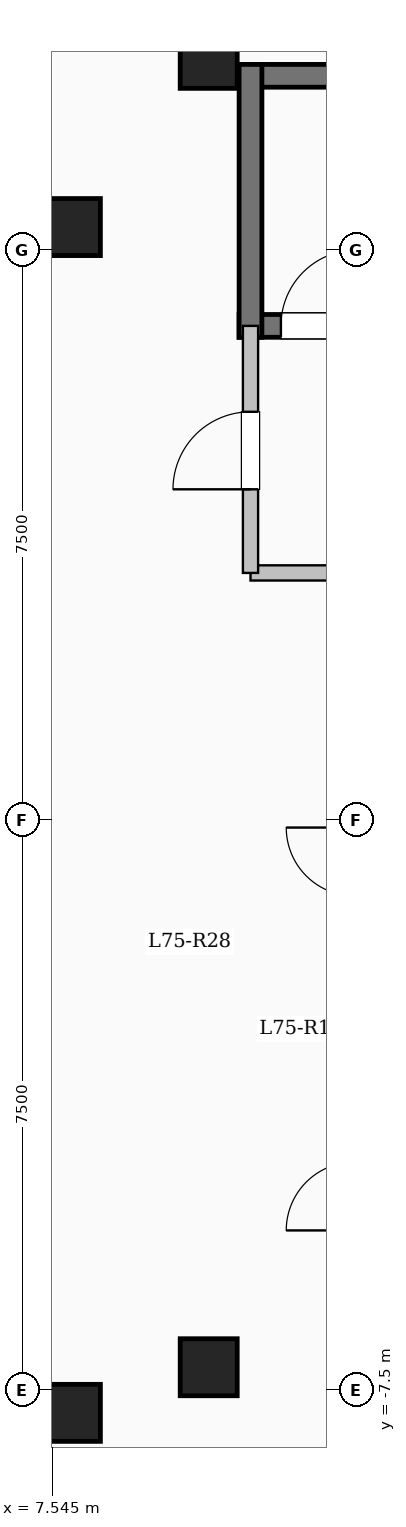
"""IFC4 building model, lengths in metres.
Left out: names, types, materials, properties, quantities, classifications, styles, units other than length and angle.
Written with IfcOpenShell. Run it as: python <this file> out.ifc"""

import sys

from ifc_helpers import new_model, si_unit, direction, frame, frame_2d, origin, origin_2d, place, context, subcontext, project, spatial, rectangle, extrude, element, fill, save


model = new_model("IFC4")
c1 = context("Model", 3, precision=1e-05, world=origin(), true_north=direction((0.0, 1.0)))
c2 = subcontext(c1, "Body", "Model", "MODEL_VIEW")
j1 = project(units=[si_unit("LENGTHUNIT", "METRE"), si_unit("PLANEANGLEUNIT", "RADIAN")], contexts=[c1])
p1 = place(None, origin())
s1 = spatial("IfcSite", under=j1, at=p1, CompositionType="ELEMENT")
p2 = place(p1, origin())
s2 = spatial("IfcBuilding", under=s1, at=p2, CompositionType="ELEMENT")
p3 = place(p2, frame((0.0, 0.0, 276.3)))
s3 = spatial("IfcBuildingStorey", under=s2, at=p3, CompositionType="ELEMENT", Elevation=276.3)
for number, where, z_axis, x_axis in (
    (1, (7.8, -7.8, 0.0), (0.0, 0.0, 1.0), (1.0, 0.0, 0.0)),
    (2, (7.8, 7.8, 0.0), (0.0, 0.0, 1.0), (1.0, 0.0, 0.0)),
    (3, (9.6, -7.2, 0.0), (0.0, 0.0, 1.0), (1.0, 0.0, 0.0)),
    (4, (9.6, 10.0, 0.0), (0.0, 0.0, 1.0), (1.0, 0.0, 0.0)),
):
    element("IfcColumn", number, at=place(p3, frame(where, z_axis=z_axis, x_axis=x_axis)), inside=s3, PredefinedType="COLUMN", context=c2, shape_type="SweptSolid", body=[
        extrude(rectangle(XDim=0.75, YDim=0.75, at=origin_2d()), origin(), (0.0, 0.0, 1.0), 5.25),
    ])
p4 = place(p3, frame((10.0, 9.79, 0.0), z_axis=(0.0, 0.0, 1.0), x_axis=(1.0, 0.0, 0.0)))
e5 = element("IfcWall", 5, at=p4, inside=s3, PredefinedType="SHEAR", context=c2, shape_type="SweptSolid", body=[
    extrude(rectangle(XDim=8.0, YDim=0.3, at=frame_2d((4.0, 0.0))), origin(), (0.0, 0.0, 1.0), 5.25),
])
p5 = place(p3, frame((10.0, 6.5, 0.0), z_axis=(0.0, 0.0, 1.0), x_axis=(1.0, 0.0, 0.0)))
e6 = element("IfcWall", 6, at=p5, inside=s3, PredefinedType="SHEAR", context=c2, shape_type="SweptSolid", body=[
    extrude(rectangle(XDim=8.0, YDim=0.3, at=frame_2d((4.0, 0.0))), origin(), (0.0, 0.0, 1.0), 5.25),
])
p6 = place(p5, frame((0.55, 0.0, 0.0)))
e7 = element("IfcOpeningElement", 7, at=p6, cuts=e6, PredefinedType="OPENING", context=c2, shape_type="SweptSolid", body=[
    extrude(rectangle(XDim=1.0, YDim=2.15, at=frame_2d((0.5, 1.075))), frame((0.0, 0.16, 0.0), z_axis=(0.0, -1.0, 0.0), x_axis=(1.0, 0.0, 0.0)), (0.0, 0.0, 1.0), 0.32),
])
p7 = place(p3, frame((10.15, 6.35, 0.0), z_axis=(0.0, 0.0, 1.0), x_axis=(0.0, 1.0, 0.0)))
e8 = element("IfcWall", 8, at=p7, inside=s3, PredefinedType="SHEAR", context=c2, shape_type="SweptSolid", body=[
    extrude(rectangle(XDim=3.59, YDim=0.3, at=frame_2d((1.795, 0.0))), origin(), (0.0, 0.0, 1.0), 5.25),
])
p8 = place(p3, frame((10.15, 3.25, 0.0), z_axis=(0.0, 0.0, 1.0), x_axis=(1.0, 0.0, 0.0)))
e9 = element("IfcWall", 9, at=p8, inside=s3, PredefinedType="SOLIDWALL", context=c2, shape_type="SweptSolid", body=[
    extrude(rectangle(XDim=5.4, YDim=0.2, at=frame_2d((2.7, 0.0))), origin(), (0.0, 0.0, 1.0), 4.95),
])
p9 = place(p3, frame((10.15, 3.25, 0.0), z_axis=(0.0, 0.0, 1.0), x_axis=(0.0, 1.0, 0.0)))
e10 = element("IfcWall", 10, at=p9, inside=s3, PredefinedType="SOLIDWALL", context=c2, shape_type="SweptSolid", body=[
    extrude(rectangle(XDim=3.25, YDim=0.2, at=frame_2d((1.625, 0.0))), origin(), (0.0, 0.0, 1.0), 4.95),
])
p10 = place(p9, frame((1.1, 0.0, 0.0)))
e11 = element("IfcOpeningElement", 11, at=p10, cuts=e10, PredefinedType="OPENING", context=c2, shape_type="SweptSolid", body=[
    extrude(rectangle(XDim=1.02, YDim=2.15, at=frame_2d((0.51, 1.075))), frame((0.0, 0.11, 0.0), z_axis=(0.0, -1.0, 0.0), x_axis=(1.0, 0.0, 0.0)), (0.0, 0.0, 1.0), 0.22),
])
p11 = place(p6, origin())
e12 = element("IfcDoor", 12, at=p11, inside=s3, OperationType="SINGLE_SWING_RIGHT", PredefinedType="DOOR", context=c2, shape_type="SweptSolid", body=[
    extrude(rectangle(XDim=1.0, YDim=2.15, at=frame_2d((0.5, 1.075))), frame((0.0, 0.025, 0.0), z_axis=(0.0, -1.0, 0.0), x_axis=(1.0, 0.0, 0.0)), (0.0, 0.0, 1.0), 0.05),
])
fill(e7, e12)
p12 = place(p10, origin())
e13 = element("IfcDoor", 13, at=p12, inside=s3, OperationType="SINGLE_SWING_LEFT", PredefinedType="DOOR", context=c2, shape_type="SweptSolid", body=[
    extrude(rectangle(XDim=1.02, YDim=2.15, at=frame_2d((0.51, 1.075))), frame((0.0, 0.025, 0.0), z_axis=(0.0, -1.0, 0.0), x_axis=(1.0, 0.0, 0.0)), (0.0, 0.0, 1.0), 0.05),
])
fill(e11, e13)
save(model, sys.argv[1])
